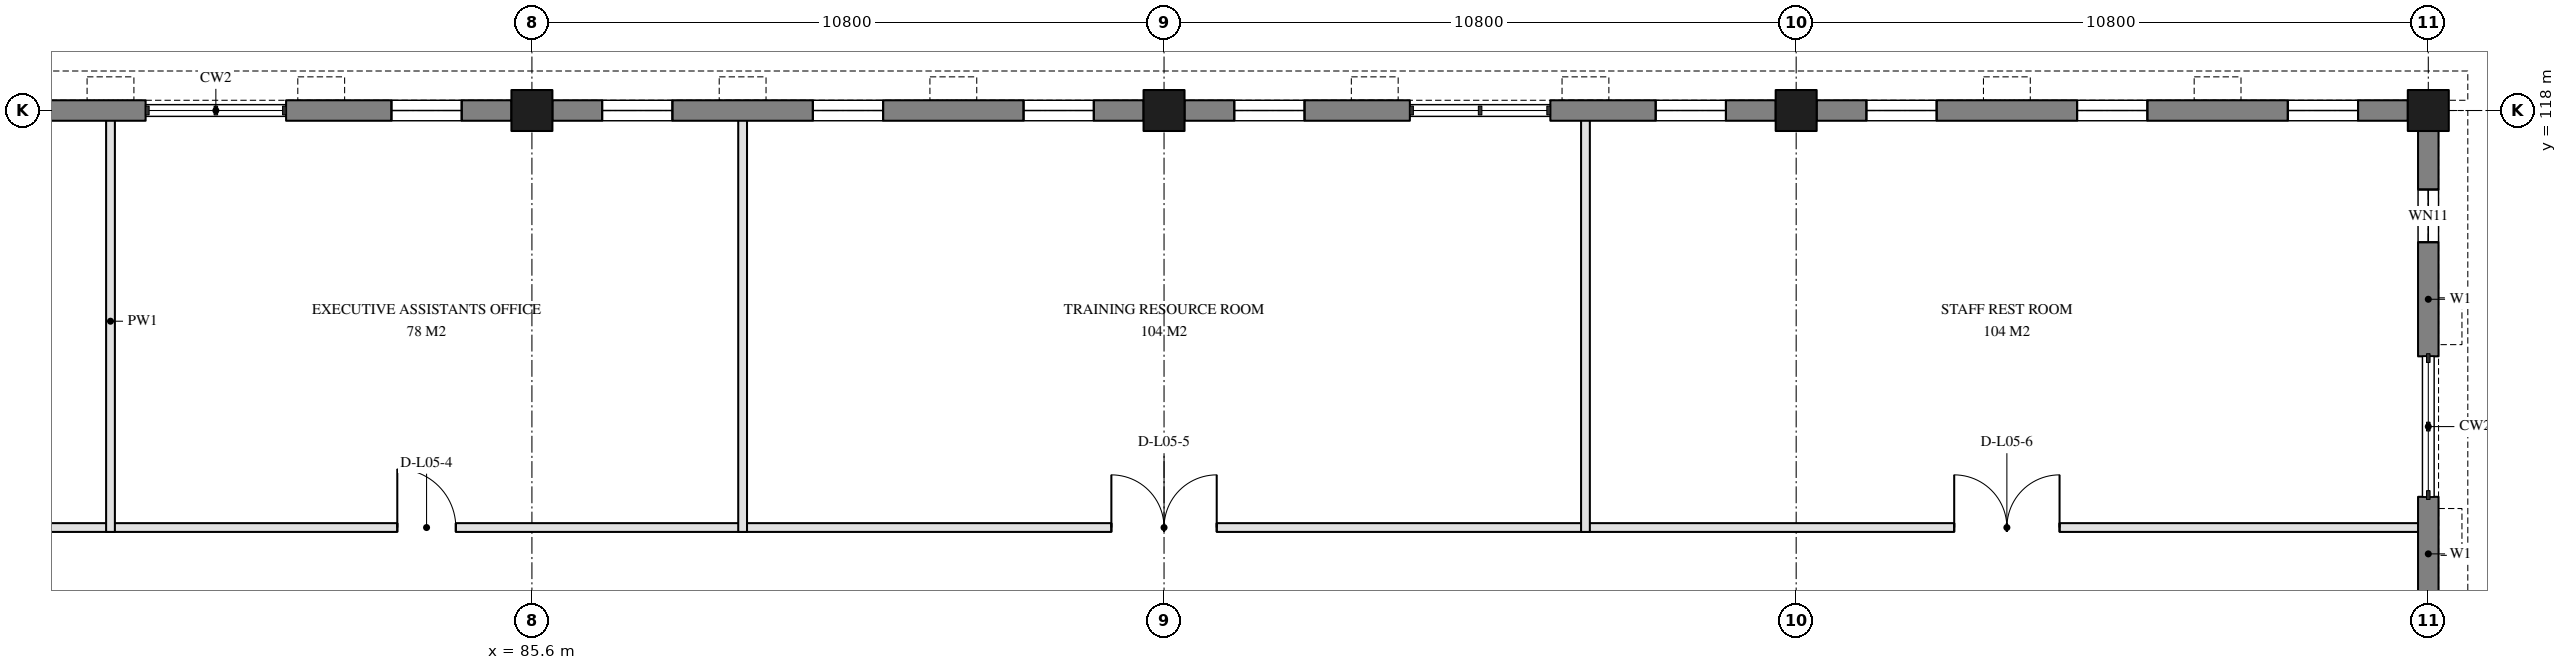
"""IFC4 building model, lengths in metres.
Left out: names, types, materials, properties, quantities, classifications, styles, units other than length and angle.
Written with IfcOpenShell. Run it as: python <this file> out.ifc"""

import sys

from ifc_helpers import new_model, si_unit, direction, frame, frame_2d, origin, origin_2d, place, context, subcontext, project, spatial, rectangle, extrude, element, fill, save


model = new_model("IFC4")
c1 = context("Model", 3, precision=1e-05, world=origin(), true_north=direction((0.0, 1.0)))
c2 = subcontext(c1, "Body", "Model", "MODEL_VIEW")
j1 = project(units=[si_unit("LENGTHUNIT", "METRE"), si_unit("PLANEANGLEUNIT", "RADIAN")], contexts=[c1])
p1 = place(None, origin())
s1 = spatial("IfcSite", under=j1, at=p1, CompositionType="ELEMENT")
p2 = place(p1, origin())
s2 = spatial("IfcBuilding", under=s1, at=p2, CompositionType="ELEMENT")
p3 = place(p2, frame((0.0, 0.0, 20.4)))
s3 = spatial("IfcBuildingStorey", under=s2, at=p3, CompositionType="ELEMENT", Elevation=20.4)
for number, where, z_axis, x_axis in (
    (1, (85.6, 118.0, 0.0), (0.0, 0.0, 1.0), (1.0, 0.0, 0.0)),
    (2, (96.4, 118.0, 0.0), (0.0, 0.0, 1.0), (1.0, 0.0, 0.0)),
    (3, (107.2, 118.0, 0.0), (0.0, 0.0, 1.0), (1.0, 0.0, 0.0)),
    (4, (118.0, 118.0, 0.0), (0.0, 0.0, 1.0), (1.0, 0.0, 0.0)),
):
    element("IfcColumn", number, at=place(p3, frame(where, z_axis=z_axis, x_axis=x_axis)), inside=s3, PredefinedType="COLUMN", context=c2, shape_type="SweptSolid", body=[
        extrude(rectangle(XDim=0.7, YDim=0.7, at=origin_2d()), origin(), (0.0, 0.0, 1.0), 3.9),
    ])
p4 = place(p3, frame((75.15, 118.0, 0.0), z_axis=(0.0, 0.0, 1.0), x_axis=(1.0, 0.0, 0.0)))
e5 = element("IfcWall", 5, at=p4, inside=s3, PredefinedType="SOLIDWALL", context=c2, shape_type="SweptSolid", body=[
    extrude(rectangle(XDim=3.85, YDim=0.35, at=frame_2d((1.925, 0.0))), origin(), (0.0, 0.0, 1.0), 2.8),
])
p5 = place(p4, frame((0.85, 0.0, 0.9)))
e6 = element("IfcOpeningElement", 6, at=p5, cuts=e5, PredefinedType="OPENING", context=c2, shape_type="SweptSolid", body=[
    extrude(rectangle(XDim=1.2, YDim=1.8, at=frame_2d((0.6, 0.9))), frame((0.0, 0.185, 0.0), z_axis=(0.0, -1.0, 0.0), x_axis=(1.0, 0.0, 0.0)), (0.0, 0.0, 1.0), 0.37),
])
p6 = place(p3, frame((81.4, 118.0, 0.0), z_axis=(0.0, 0.0, 1.0), x_axis=(1.0, 0.0, 0.0)))
e7 = element("IfcWall", 7, at=p6, inside=s3, PredefinedType="SOLIDWALL", context=c2, shape_type="SweptSolid", body=[
    extrude(rectangle(XDim=3.85, YDim=0.35, at=frame_2d((1.925, 0.0))), origin(), (0.0, 0.0, 1.0), 2.8),
])
p7 = place(p6, frame((1.8, 0.0, 0.9)))
e8 = element("IfcOpeningElement", 8, at=p7, cuts=e7, PredefinedType="OPENING", context=c2, shape_type="SweptSolid", body=[
    extrude(rectangle(XDim=1.2, YDim=1.8, at=frame_2d((0.6, 0.9))), frame((0.0, 0.185, 0.0), z_axis=(0.0, -1.0, 0.0), x_axis=(1.0, 0.0, 0.0)), (0.0, 0.0, 1.0), 0.37),
])
p8 = place(p3, frame((85.95, 118.0, 0.0), z_axis=(0.0, 0.0, 1.0), x_axis=(1.0, 0.0, 0.0)))
e9 = element("IfcWall", 9, at=p8, inside=s3, PredefinedType="SOLIDWALL", context=c2, shape_type="SweptSolid", body=[
    extrude(rectangle(XDim=10.1, YDim=0.35, at=frame_2d((5.05, 0.0))), origin(), (0.0, 0.0, 1.0), 2.8),
])
p9 = place(p8, frame((0.85, 0.0, 0.9)))
e10 = element("IfcOpeningElement", 10, at=p9, cuts=e9, PredefinedType="OPENING", context=c2, shape_type="SweptSolid", body=[
    extrude(rectangle(XDim=1.2, YDim=1.8, at=frame_2d((0.6, 0.9))), frame((0.0, 0.185, 0.0), z_axis=(0.0, -1.0, 0.0), x_axis=(1.0, 0.0, 0.0)), (0.0, 0.0, 1.0), 0.37),
])
p10 = place(p8, frame((4.45, 0.0, 0.9)))
e11 = element("IfcOpeningElement", 11, at=p10, cuts=e9, PredefinedType="OPENING", context=c2, shape_type="SweptSolid", body=[
    extrude(rectangle(XDim=1.2, YDim=1.8, at=frame_2d((0.6, 0.9))), frame((0.0, 0.185, 0.0), z_axis=(0.0, -1.0, 0.0), x_axis=(1.0, 0.0, 0.0)), (0.0, 0.0, 1.0), 0.37),
])
p11 = place(p8, frame((8.05, 0.0, 0.9)))
e12 = element("IfcOpeningElement", 12, at=p11, cuts=e9, PredefinedType="OPENING", context=c2, shape_type="SweptSolid", body=[
    extrude(rectangle(XDim=1.2, YDim=1.8, at=frame_2d((0.6, 0.9))), frame((0.0, 0.185, 0.0), z_axis=(0.0, -1.0, 0.0), x_axis=(1.0, 0.0, 0.0)), (0.0, 0.0, 1.0), 0.37),
])
p12 = place(p3, frame((96.75, 118.0, 0.0), z_axis=(0.0, 0.0, 1.0), x_axis=(1.0, 0.0, 0.0)))
e13 = element("IfcWall", 13, at=p12, inside=s3, PredefinedType="SOLIDWALL", context=c2, shape_type="SweptSolid", body=[
    extrude(rectangle(XDim=3.85, YDim=0.35, at=frame_2d((1.925, 0.0))), origin(), (0.0, 0.0, 1.0), 2.8),
])
p13 = place(p12, frame((0.85, 0.0, 0.9)))
e14 = element("IfcOpeningElement", 14, at=p13, cuts=e13, PredefinedType="OPENING", context=c2, shape_type="SweptSolid", body=[
    extrude(rectangle(XDim=1.2, YDim=1.8, at=frame_2d((0.6, 0.9))), frame((0.0, 0.185, 0.0), z_axis=(0.0, -1.0, 0.0), x_axis=(1.0, 0.0, 0.0)), (0.0, 0.0, 1.0), 0.37),
])
p14 = place(p3, frame((103.0, 118.0, 0.0), z_axis=(0.0, 0.0, 1.0), x_axis=(1.0, 0.0, 0.0)))
e15 = element("IfcWall", 15, at=p14, inside=s3, PredefinedType="SOLIDWALL", context=c2, shape_type="SweptSolid", body=[
    extrude(rectangle(XDim=3.85, YDim=0.35, at=frame_2d((1.925, 0.0))), origin(), (0.0, 0.0, 1.0), 2.8),
])
p15 = place(p14, frame((1.8, 0.0, 0.9)))
e16 = element("IfcOpeningElement", 16, at=p15, cuts=e15, PredefinedType="OPENING", context=c2, shape_type="SweptSolid", body=[
    extrude(rectangle(XDim=1.2, YDim=1.8, at=frame_2d((0.6, 0.9))), frame((0.0, 0.185, 0.0), z_axis=(0.0, -1.0, 0.0), x_axis=(1.0, 0.0, 0.0)), (0.0, 0.0, 1.0), 0.37),
])
p16 = place(p3, frame((107.55, 118.0, 0.0), z_axis=(0.0, 0.0, 1.0), x_axis=(1.0, 0.0, 0.0)))
e17 = element("IfcWall", 17, at=p16, inside=s3, PredefinedType="SOLIDWALL", context=c2, shape_type="SweptSolid", body=[
    extrude(rectangle(XDim=10.1, YDim=0.35, at=frame_2d((5.05, 0.0))), origin(), (0.0, 0.0, 1.0), 2.8),
])
p17 = place(p16, frame((0.85, 0.0, 0.9)))
e18 = element("IfcOpeningElement", 18, at=p17, cuts=e17, PredefinedType="OPENING", context=c2, shape_type="SweptSolid", body=[
    extrude(rectangle(XDim=1.2, YDim=1.8, at=frame_2d((0.6, 0.9))), frame((0.0, 0.185, 0.0), z_axis=(0.0, -1.0, 0.0), x_axis=(1.0, 0.0, 0.0)), (0.0, 0.0, 1.0), 0.37),
])
p18 = place(p16, frame((4.45, 0.0, 0.9)))
e19 = element("IfcOpeningElement", 19, at=p18, cuts=e17, PredefinedType="OPENING", context=c2, shape_type="SweptSolid", body=[
    extrude(rectangle(XDim=1.2, YDim=1.8, at=frame_2d((0.6, 0.9))), frame((0.0, 0.185, 0.0), z_axis=(0.0, -1.0, 0.0), x_axis=(1.0, 0.0, 0.0)), (0.0, 0.0, 1.0), 0.37),
])
p19 = place(p16, frame((8.05, 0.0, 0.9)))
e20 = element("IfcOpeningElement", 20, at=p19, cuts=e17, PredefinedType="OPENING", context=c2, shape_type="SweptSolid", body=[
    extrude(rectangle(XDim=1.2, YDim=1.8, at=frame_2d((0.6, 0.9))), frame((0.0, 0.185, 0.0), z_axis=(0.0, -1.0, 0.0), x_axis=(1.0, 0.0, 0.0)), (0.0, 0.0, 1.0), 0.37),
])
p20 = place(p3, frame((118.0, 107.55, 0.0), z_axis=(0.0, 0.0, 1.0), x_axis=(0.0, 1.0, 0.0)))
e21 = element("IfcWall", 21, at=p20, inside=s3, PredefinedType="SOLIDWALL", context=c2, shape_type="SweptSolid", body=[
    extrude(rectangle(XDim=3.85, YDim=0.35, at=frame_2d((1.925, 0.0))), origin(), (0.0, 0.0, 1.0), 2.8),
])
p21 = place(p20, frame((1.0, 0.0, 0.9)))
e22 = element("IfcOpeningElement", 22, at=p21, cuts=e21, PredefinedType="OPENING", context=c2, shape_type="SweptSolid", body=[
    extrude(rectangle(XDim=0.9, YDim=1.8, at=frame_2d((0.45, 0.9))), frame((0.0, 0.185, 0.0), z_axis=(0.0, -1.0, 0.0), x_axis=(1.0, 0.0, 0.0)), (0.0, 0.0, 1.0), 0.37),
])
p22 = place(p3, frame((118.0, 113.8, 0.0), z_axis=(0.0, 0.0, 1.0), x_axis=(0.0, 1.0, 0.0)))
e23 = element("IfcWall", 23, at=p22, inside=s3, PredefinedType="SOLIDWALL", context=c2, shape_type="SweptSolid", body=[
    extrude(rectangle(XDim=3.85, YDim=0.35, at=frame_2d((1.925, 0.0))), origin(), (0.0, 0.0, 1.0), 2.8),
])
p23 = place(p22, frame((1.95, 0.0, 0.9)))
e24 = element("IfcOpeningElement", 24, at=p23, cuts=e23, PredefinedType="OPENING", context=c2, shape_type="SweptSolid", body=[
    extrude(rectangle(XDim=0.9, YDim=1.8, at=frame_2d((0.45, 0.9))), frame((0.0, 0.185, 0.0), z_axis=(0.0, -1.0, 0.0), x_axis=(1.0, 0.0, 0.0)), (0.0, 0.0, 1.0), 0.37),
])
p24 = place(p3, frame((64.0, 110.875, 0.0), z_axis=(0.0, 0.0, 1.0), x_axis=(1.0, 0.0, 0.0)))
e25 = element("IfcWall", 25, at=p24, inside=s3, PredefinedType="PARTITIONING", context=c2, shape_type="SweptSolid", body=[
    extrude(rectangle(XDim=14.4, YDim=0.15, at=frame_2d((7.2, 0.0))), origin(), (0.0, 0.0, 1.0), 2.8),
])
p25 = place(p24, frame((6.3, 0.0, 0.0)))
e26 = element("IfcOpeningElement", 26, at=p25, cuts=e25, PredefinedType="OPENING", context=c2, shape_type="SweptSolid", body=[
    extrude(rectangle(XDim=1.8, YDim=2.1, at=frame_2d((0.9, 1.05))), frame((0.0, 0.085, 0.0), z_axis=(0.0, -1.0, 0.0), x_axis=(1.0, 0.0, 0.0)), (0.0, 0.0, 1.0), 0.17),
])
p26 = place(p3, frame((78.4, 110.875, 0.0), z_axis=(0.0, 0.0, 1.0), x_axis=(1.0, 0.0, 0.0)))
e27 = element("IfcWall", 27, at=p26, inside=s3, PredefinedType="PARTITIONING", context=c2, shape_type="SweptSolid", body=[
    extrude(rectangle(XDim=10.8, YDim=0.15, at=frame_2d((5.4, 0.0))), origin(), (0.0, 0.0, 1.0), 2.8),
])
p27 = place(p26, frame((4.9, 0.0, 0.0)))
e28 = element("IfcOpeningElement", 28, at=p27, cuts=e27, PredefinedType="OPENING", context=c2, shape_type="SweptSolid", body=[
    extrude(rectangle(XDim=1.0, YDim=2.1, at=frame_2d((0.5, 1.05))), frame((0.0, 0.085, 0.0), z_axis=(0.0, -1.0, 0.0), x_axis=(1.0, 0.0, 0.0)), (0.0, 0.0, 1.0), 0.17),
])
p28 = place(p3, frame((89.2, 110.875, 0.0), z_axis=(0.0, 0.0, 1.0), x_axis=(1.0, 0.0, 0.0)))
e29 = element("IfcWall", 29, at=p28, inside=s3, PredefinedType="PARTITIONING", context=c2, shape_type="SweptSolid", body=[
    extrude(rectangle(XDim=14.4, YDim=0.15, at=frame_2d((7.2, 0.0))), origin(), (0.0, 0.0, 1.0), 2.8),
])
p29 = place(p28, frame((6.3, 0.0, 0.0)))
e30 = element("IfcOpeningElement", 30, at=p29, cuts=e29, PredefinedType="OPENING", context=c2, shape_type="SweptSolid", body=[
    extrude(rectangle(XDim=1.8, YDim=2.1, at=frame_2d((0.9, 1.05))), frame((0.0, 0.085, 0.0), z_axis=(0.0, -1.0, 0.0), x_axis=(1.0, 0.0, 0.0)), (0.0, 0.0, 1.0), 0.17),
])
p30 = place(p3, frame((103.6, 110.875, 0.0), z_axis=(0.0, 0.0, 1.0), x_axis=(1.0, 0.0, 0.0)))
e31 = element("IfcWall", 31, at=p30, inside=s3, PredefinedType="PARTITIONING", context=c2, shape_type="SweptSolid", body=[
    extrude(rectangle(XDim=14.4, YDim=0.15, at=frame_2d((7.2, 0.0))), origin(), (0.0, 0.0, 1.0), 2.8),
])
p31 = place(p30, frame((6.3, 0.0, 0.0)))
e32 = element("IfcOpeningElement", 32, at=p31, cuts=e31, PredefinedType="OPENING", context=c2, shape_type="SweptSolid", body=[
    extrude(rectangle(XDim=1.8, YDim=2.1, at=frame_2d((0.9, 1.05))), frame((0.0, 0.085, 0.0), z_axis=(0.0, -1.0, 0.0), x_axis=(1.0, 0.0, 0.0)), (0.0, 0.0, 1.0), 0.17),
])
for number, where, z_axis, x_axis in (
    (33, (78.4, 110.8, 0.0), (0.0, 0.0, 1.0), (0.0, 1.0, 0.0)),
    (34, (89.2, 110.8, 0.0), (0.0, 0.0, 1.0), (0.0, 1.0, 0.0)),
    (35, (103.6, 110.8, 0.0), (0.0, 0.0, 1.0), (0.0, 1.0, 0.0)),
):
    element("IfcWall", number, at=place(p3, frame(where, z_axis=z_axis, x_axis=x_axis)), inside=s3, PredefinedType="PARTITIONING", context=c2, shape_type="SweptSolid", body=[
        extrude(rectangle(XDim=7.2, YDim=0.15, at=frame_2d((3.6, 0.0))), origin(), (0.0, 0.0, 1.0), 2.8),
    ])
p32 = place(p7, origin())
e36 = element("IfcWindow", 36, at=p32, inside=s3, PartitioningType="SINGLE_PANEL", PredefinedType="WINDOW", context=c2, shape_type="SweptSolid", body=[
    extrude(rectangle(XDim=1.2, YDim=1.8, at=frame_2d((0.6, 0.9))), frame((0.0, 0.03, 0.0), z_axis=(0.0, -1.0, 0.0), x_axis=(1.0, 0.0, 0.0)), (0.0, 0.0, 1.0), 0.06),
])
fill(e8, e36)
p33 = place(p9, origin())
e37 = element("IfcWindow", 37, at=p33, inside=s3, PartitioningType="SINGLE_PANEL", PredefinedType="WINDOW", context=c2, shape_type="SweptSolid", body=[
    extrude(rectangle(XDim=1.2, YDim=1.8, at=frame_2d((0.6, 0.9))), frame((0.0, 0.03, 0.0), z_axis=(0.0, -1.0, 0.0), x_axis=(1.0, 0.0, 0.0)), (0.0, 0.0, 1.0), 0.06),
])
fill(e10, e37)
p34 = place(p10, origin())
e38 = element("IfcWindow", 38, at=p34, inside=s3, PartitioningType="SINGLE_PANEL", PredefinedType="WINDOW", context=c2, shape_type="SweptSolid", body=[
    extrude(rectangle(XDim=1.2, YDim=1.8, at=frame_2d((0.6, 0.9))), frame((0.0, 0.03, 0.0), z_axis=(0.0, -1.0, 0.0), x_axis=(1.0, 0.0, 0.0)), (0.0, 0.0, 1.0), 0.06),
])
fill(e11, e38)
p35 = place(p11, origin())
e39 = element("IfcWindow", 39, at=p35, inside=s3, PartitioningType="SINGLE_PANEL", PredefinedType="WINDOW", context=c2, shape_type="SweptSolid", body=[
    extrude(rectangle(XDim=1.2, YDim=1.8, at=frame_2d((0.6, 0.9))), frame((0.0, 0.03, 0.0), z_axis=(0.0, -1.0, 0.0), x_axis=(1.0, 0.0, 0.0)), (0.0, 0.0, 1.0), 0.06),
])
fill(e12, e39)
p36 = place(p13, origin())
e40 = element("IfcWindow", 40, at=p36, inside=s3, PartitioningType="SINGLE_PANEL", PredefinedType="WINDOW", context=c2, shape_type="SweptSolid", body=[
    extrude(rectangle(XDim=1.2, YDim=1.8, at=frame_2d((0.6, 0.9))), frame((0.0, 0.03, 0.0), z_axis=(0.0, -1.0, 0.0), x_axis=(1.0, 0.0, 0.0)), (0.0, 0.0, 1.0), 0.06),
])
fill(e14, e40)
p37 = place(p15, origin())
e41 = element("IfcWindow", 41, at=p37, inside=s3, PartitioningType="SINGLE_PANEL", PredefinedType="WINDOW", context=c2, shape_type="SweptSolid", body=[
    extrude(rectangle(XDim=1.2, YDim=1.8, at=frame_2d((0.6, 0.9))), frame((0.0, 0.03, 0.0), z_axis=(0.0, -1.0, 0.0), x_axis=(1.0, 0.0, 0.0)), (0.0, 0.0, 1.0), 0.06),
])
fill(e16, e41)
p38 = place(p17, origin())
e42 = element("IfcWindow", 42, at=p38, inside=s3, PartitioningType="SINGLE_PANEL", PredefinedType="WINDOW", context=c2, shape_type="SweptSolid", body=[
    extrude(rectangle(XDim=1.2, YDim=1.8, at=frame_2d((0.6, 0.9))), frame((0.0, 0.03, 0.0), z_axis=(0.0, -1.0, 0.0), x_axis=(1.0, 0.0, 0.0)), (0.0, 0.0, 1.0), 0.06),
])
fill(e18, e42)
p39 = place(p18, origin())
e43 = element("IfcWindow", 43, at=p39, inside=s3, PartitioningType="SINGLE_PANEL", PredefinedType="WINDOW", context=c2, shape_type="SweptSolid", body=[
    extrude(rectangle(XDim=1.2, YDim=1.8, at=frame_2d((0.6, 0.9))), frame((0.0, 0.03, 0.0), z_axis=(0.0, -1.0, 0.0), x_axis=(1.0, 0.0, 0.0)), (0.0, 0.0, 1.0), 0.06),
])
fill(e19, e43)
p40 = place(p19, origin())
e44 = element("IfcWindow", 44, at=p40, inside=s3, PartitioningType="SINGLE_PANEL", PredefinedType="WINDOW", context=c2, shape_type="SweptSolid", body=[
    extrude(rectangle(XDim=1.2, YDim=1.8, at=frame_2d((0.6, 0.9))), frame((0.0, 0.03, 0.0), z_axis=(0.0, -1.0, 0.0), x_axis=(1.0, 0.0, 0.0)), (0.0, 0.0, 1.0), 0.06),
])
fill(e20, e44)
p41 = place(p23, origin())
e45 = element("IfcWindow", 45, at=p41, inside=s3, PartitioningType="SINGLE_PANEL", PredefinedType="WINDOW", context=c2, shape_type="SweptSolid", body=[
    extrude(rectangle(XDim=0.9, YDim=1.8, at=frame_2d((0.45, 0.9))), frame((0.0, 0.03, 0.0), z_axis=(0.0, -1.0, 0.0), x_axis=(1.0, 0.0, 0.0)), (0.0, 0.0, 1.0), 0.06),
])
fill(e24, e45)
p42 = place(p27, origin())
e46 = element("IfcDoor", 46, at=p42, inside=s3, OperationType="SINGLE_SWING_RIGHT", PredefinedType="DOOR", context=c2, shape_type="SweptSolid", body=[
    extrude(rectangle(XDim=1.0, YDim=2.1, at=frame_2d((0.5, 1.05))), frame((0.0, 0.025, 0.0), z_axis=(0.0, -1.0, 0.0), x_axis=(1.0, 0.0, 0.0)), (0.0, 0.0, 1.0), 0.05),
])
fill(e28, e46)
p43 = place(p29, frame((1.8, 0.0, 0.0), z_axis=(0.0, 0.0, 1.0), x_axis=(-1.0, 0.0, 0.0)))
e47 = element("IfcDoor", 47, at=p43, inside=s3, OperationType="DOUBLE_DOOR_DOUBLE_SWING", PredefinedType="DOOR", context=c2, shape_type="SweptSolid", body=[
    extrude(rectangle(XDim=1.8, YDim=2.1, at=frame_2d((0.9, 1.05))), frame((0.0, 0.025, 0.0), z_axis=(0.0, -1.0, 0.0), x_axis=(1.0, 0.0, 0.0)), (0.0, 0.0, 1.0), 0.05),
])
fill(e30, e47)
p44 = place(p31, origin())
e48 = element("IfcDoor", 48, at=p44, inside=s3, OperationType="DOUBLE_DOOR_DOUBLE_SWING", PredefinedType="DOOR", context=c2, shape_type="SweptSolid", body=[
    extrude(rectangle(XDim=1.8, YDim=2.1, at=frame_2d((0.9, 1.05))), frame((0.0, 0.025, 0.0), z_axis=(0.0, -1.0, 0.0), x_axis=(1.0, 0.0, 0.0)), (0.0, 0.0, 1.0), 0.05),
])
fill(e32, e48)
save(model, sys.argv[1])
